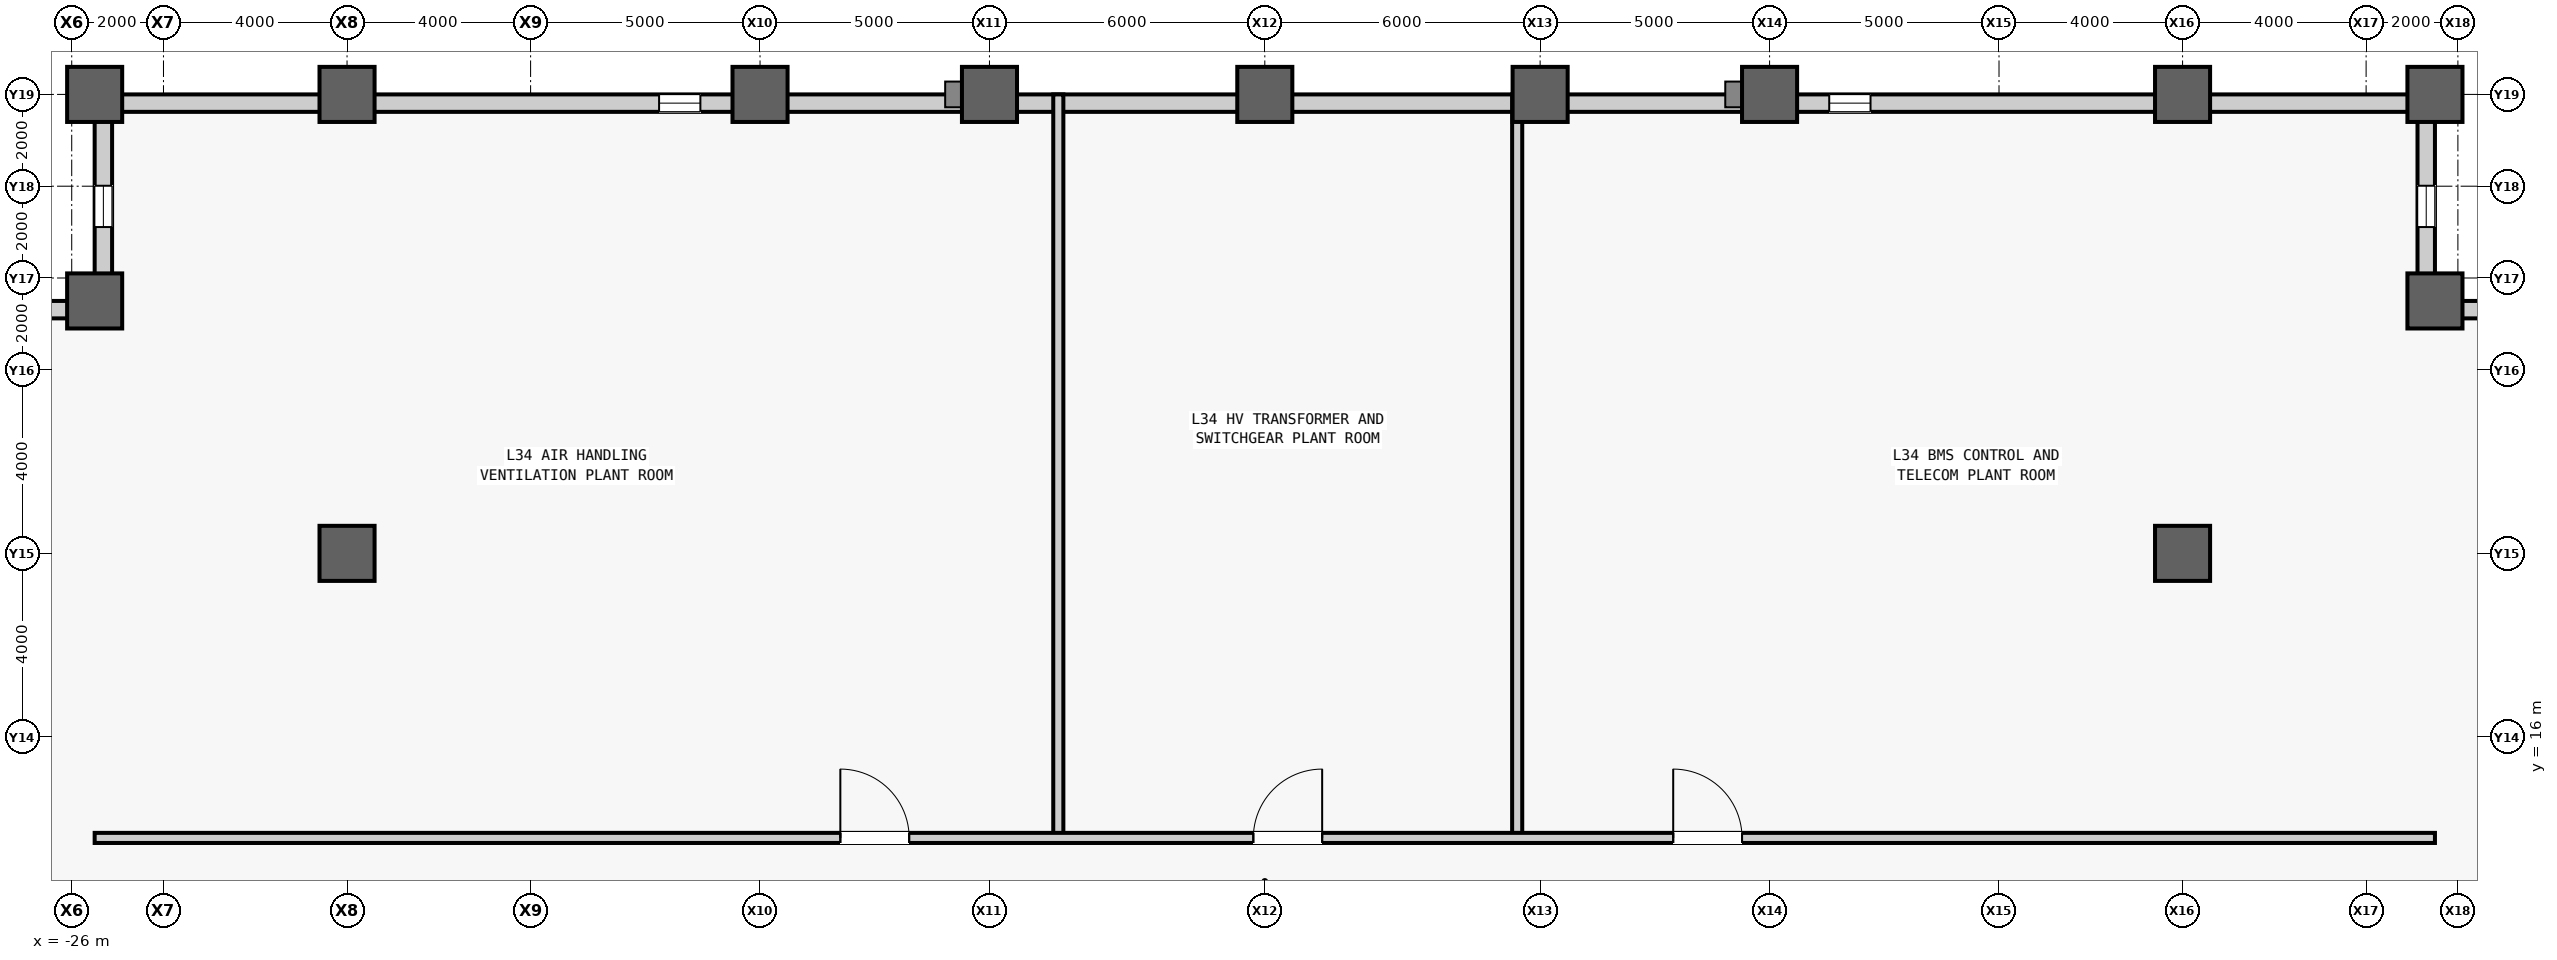
"""IFC4 building model, lengths in metres.
Left out: names, types, materials, properties, quantities, classifications, styles, units other than length and angle.
Written with IfcOpenShell. Run it as: python <this file> out.ifc"""

import sys

from ifc_helpers import new_model, si_unit, direction, frame, frame_2d, origin, origin_2d, place, context, subcontext, project, spatial, rectangle, hollow_rectangle, extrude, source, transform, mapped, element, fill, save


model = new_model("IFC4")
c1 = context("Model", 3, precision=1e-05, world=origin(), true_north=direction((0.0, 1.0)))
c2 = subcontext(c1, "Body", "Model", "MODEL_VIEW")
j1 = project(units=[si_unit("LENGTHUNIT", "METRE"), si_unit("PLANEANGLEUNIT", "RADIAN")], contexts=[c1])
p1 = place(None, origin())
s1 = spatial("IfcSite", under=j1, at=p1, CompositionType="ELEMENT")
p2 = place(p1, origin())
s2 = spatial("IfcBuilding", under=s1, at=p2, CompositionType="ELEMENT")
p3 = place(p2, frame((0.0, 0.0, 149.9)))
s3 = spatial("IfcBuildingStorey", under=s2, at=p3, CompositionType="ELEMENT", Elevation=149.9)
m1 = source(origin(), c2, "Body", "SweptSolid", [
    extrude(hollow_rectangle(XDim=1.2, YDim=1.2, WallThickness=0.07, at=origin_2d()), origin(), (0.0, 0.0, 1.0), 5.2),
])
for number, where, z_axis, x_axis in (
    (1, (-25.5, 25.5, 0.0), (0.0, 0.0, 1.0), (1.0, 0.0, 0.0)),
    (2, (-25.5, 30.0, 0.0), (0.0, 0.0, 1.0), (1.0, 0.0, 0.0)),
    (3, (-20.0, 20.0, 0.0), (0.0, 0.0, 1.0), (1.0, 0.0, 0.0)),
    (4, (-20.0, 30.0, 0.0), (0.0, 0.0, 1.0), (1.0, 0.0, 0.0)),
    (5, (-11.0, 30.0, 0.0), (0.0, 0.0, 1.0), (1.0, 0.0, 0.0)),
    (6, (-6.0, 30.0, 0.0), (0.0, 0.0, 1.0), (1.0, 0.0, 0.0)),
    (7, (0.0, 30.0, 0.0), (0.0, 0.0, 1.0), (1.0, 0.0, 0.0)),
    (8, (6.0, 30.0, 0.0), (0.0, 0.0, 1.0), (1.0, 0.0, 0.0)),
    (9, (11.0, 30.0, 0.0), (0.0, 0.0, 1.0), (1.0, 0.0, 0.0)),
    (10, (20.0, 20.0, 0.0), (0.0, 0.0, 1.0), (1.0, 0.0, 0.0)),
    (11, (20.0, 30.0, 0.0), (0.0, 0.0, 1.0), (1.0, 0.0, 0.0)),
    (12, (25.5, 25.5, 0.0), (0.0, 0.0, 1.0), (1.0, 0.0, 0.0)),
    (13, (25.5, 30.0, 0.0), (0.0, 0.0, 1.0), (1.0, 0.0, 0.0)),
):
    element("IfcColumn", number, at=place(p3, frame(where, z_axis=z_axis, x_axis=x_axis)), inside=s3, PredefinedType="COLUMN", context=c2, shape_type="MappedRepresentation", body=[
        mapped(m1, transform((0.0, 0.0, 0.0), scale=1.0)),
    ])
m2 = source(origin(), c2, "Body", "SweptSolid", [
    extrude(rectangle(XDim=4.12, YDim=0.38, at=frame_2d((2.06, 0.0))), origin(), (0.0, 0.0, 1.0), 4.285),
])
p4 = place(p3, frame((25.5, 25.31, 0.0), z_axis=(0.0, 0.0, 1.0), x_axis=(1.0, 0.0, 0.0)))
e14 = element("IfcWall", 14, at=p4, inside=s3, PredefinedType="STANDARD", context=c2, shape_type="MappedRepresentation", body=[
    mapped(m2, transform((0.0, 0.0, 0.0), scale=1.0)),
])
m3 = source(origin(), c2, "Body", "SweptSolid", [
    extrude(rectangle(XDim=0.9, YDim=2.4, at=frame_2d((0.45, 1.2))), frame((0.0, 0.2, 0.0), z_axis=(0.0, -1.0, 0.0), x_axis=(1.0, 0.0, 0.0)), (0.0, 0.0, 1.0), 0.4),
])
p5 = place(p4, frame((1.61, 0.0, 0.7)))
e15 = element("IfcOpeningElement", 15, at=p5, cuts=e14, PredefinedType="OPENING", context=c2, shape_type="MappedRepresentation", body=[
    mapped(m3, transform((0.0, 0.0, 0.0), scale=1.0)),
])
m4 = source(origin(), c2, "Body", "SweptSolid", [
    extrude(rectangle(XDim=4.12, YDim=0.38, at=frame_2d((2.06, 0.0))), origin(), (0.0, 0.0, 1.0), 4.205),
])
p6 = place(p3, frame((25.31, 25.5, 0.0), z_axis=(0.0, 0.0, 1.0), x_axis=(0.0, 1.0, 0.0)))
e16 = element("IfcWall", 16, at=p6, inside=s3, PredefinedType="STANDARD", context=c2, shape_type="MappedRepresentation", body=[
    mapped(m4, transform((0.0, 0.0, 0.0), scale=1.0)),
])
p7 = place(p6, frame((1.61, 0.0, 0.7)))
e17 = element("IfcOpeningElement", 17, at=p7, cuts=e16, PredefinedType="OPENING", context=c2, shape_type="MappedRepresentation", body=[
    mapped(m3, transform((0.0, 0.0, 0.0), scale=1.0)),
])
p8 = place(p3, frame((-25.31, 25.5, 0.0), z_axis=(0.0, 0.0, 1.0), x_axis=(0.0, 1.0, 0.0)))
e18 = element("IfcWall", 18, at=p8, inside=s3, PredefinedType="STANDARD", context=c2, shape_type="MappedRepresentation", body=[
    mapped(m4, transform((0.0, 0.0, 0.0), scale=1.0)),
])
p9 = place(p8, frame((1.61, 0.0, 0.7)))
e19 = element("IfcOpeningElement", 19, at=p9, cuts=e18, PredefinedType="OPENING", context=c2, shape_type="MappedRepresentation", body=[
    mapped(m3, transform((0.0, 0.0, 0.0), scale=1.0)),
])
p10 = place(p3, frame((-25.5, 25.31, 0.0), z_axis=(0.0, 0.0, 1.0), x_axis=(-1.0, 0.0, 0.0)))
e20 = element("IfcWall", 20, at=p10, inside=s3, PredefinedType="STANDARD", context=c2, shape_type="MappedRepresentation", body=[
    mapped(m2, transform((0.0, 0.0, 0.0), scale=1.0)),
])
p11 = place(p10, frame((1.61, 0.0, 0.7)))
e21 = element("IfcOpeningElement", 21, at=p11, cuts=e20, PredefinedType="OPENING", context=c2, shape_type="MappedRepresentation", body=[
    mapped(m3, transform((0.0, 0.0, 0.0), scale=1.0)),
])
m5 = source(origin(), c2, "Body", "SweptSolid", [
    extrude(rectangle(XDim=51.0, YDim=0.38, at=frame_2d((25.5, 0.0))), origin(), (0.0, 0.0, 1.0), 4.205),
])
p12 = place(p3, frame((-25.5, 29.81, 0.0), z_axis=(0.0, 0.0, 1.0), x_axis=(1.0, 0.0, 0.0)))
e22 = element("IfcWall", 22, at=p12, inside=s3, PredefinedType="STANDARD", context=c2, shape_type="MappedRepresentation", body=[
    mapped(m5, transform((0.0, 0.0, 0.0), scale=1.0)),
])
p13 = place(p12, frame((12.3, 0.0, 0.7)))
e23 = element("IfcOpeningElement", 23, at=p13, cuts=e22, PredefinedType="OPENING", context=c2, shape_type="MappedRepresentation", body=[
    mapped(m3, transform((0.0, 0.0, 0.0), scale=1.0)),
])
p14 = place(p12, frame((37.8, 0.0, 0.7)))
e24 = element("IfcOpeningElement", 24, at=p14, cuts=e22, PredefinedType="OPENING", context=c2, shape_type="MappedRepresentation", body=[
    mapped(m3, transform((0.0, 0.0, 0.0), scale=1.0)),
])
m6 = source(origin(), c2, "Body", "SweptSolid", [
    extrude(rectangle(XDim=16.2, YDim=0.22, at=frame_2d((8.1, 0.0))), origin(), (0.0, 0.0, 1.0), 4.98),
])
for number, where, z_axis, x_axis in (
    (25, (-4.5, 13.8, 0.0), (0.0, 0.0, 1.0), (0.0, 1.0, 0.0)),
    (26, (5.5, 13.8, 0.0), (0.0, 0.0, 1.0), (0.0, 1.0, 0.0)),
):
    element("IfcWall", number, at=place(p3, frame(where, z_axis=z_axis, x_axis=x_axis)), inside=s3, PredefinedType="PARTITIONING", context=c2, shape_type="MappedRepresentation", body=[
        mapped(m6, transform((0.0, 0.0, 0.0), scale=1.0)),
    ])
m7 = source(origin(), c2, "Body", "SweptSolid", [
    extrude(rectangle(XDim=51.0, YDim=0.22, at=frame_2d((25.5, 0.0))), origin(), (0.0, 0.0, 1.0), 4.98),
])
p15 = place(p3, frame((-25.5, 13.8, 0.0), z_axis=(0.0, 0.0, 1.0), x_axis=(1.0, 0.0, 0.0)))
e27 = element("IfcWall", 27, at=p15, inside=s3, PredefinedType="PARTITIONING", context=c2, shape_type="MappedRepresentation", body=[
    mapped(m7, transform((0.0, 0.0, 0.0), scale=1.0)),
])
m8 = source(origin(), c2, "Body", "SweptSolid", [
    extrude(rectangle(XDim=1.5, YDim=2.3, at=frame_2d((0.75, 1.15))), frame((0.0, 0.12, 0.0), z_axis=(0.0, -1.0, 0.0), x_axis=(1.0, 0.0, 0.0)), (0.0, 0.0, 1.0), 0.24),
])
p16 = place(p15, frame((16.25, 0.0, 0.0)))
e28 = element("IfcOpeningElement", 28, at=p16, cuts=e27, PredefinedType="OPENING", context=c2, shape_type="MappedRepresentation", body=[
    mapped(m8, transform((0.0, 0.0, 0.0), scale=1.0)),
])
p17 = place(p15, frame((25.25, 0.0, 0.0)))
e29 = element("IfcOpeningElement", 29, at=p17, cuts=e27, PredefinedType="OPENING", context=c2, shape_type="MappedRepresentation", body=[
    mapped(m8, transform((0.0, 0.0, 0.0), scale=1.0)),
])
p18 = place(p15, frame((34.4, 0.0, 0.0)))
e30 = element("IfcOpeningElement", 30, at=p18, cuts=e27, PredefinedType="OPENING", context=c2, shape_type="MappedRepresentation", body=[
    mapped(m8, transform((0.0, 0.0, 0.0), scale=1.0)),
])
m9 = source(origin(), c2, "Body", "SweptSolid", [
    extrude(rectangle(XDim=0.9, YDim=2.4, at=frame_2d((0.45, 1.2))), frame((0.0, 0.03, 0.0), z_axis=(0.0, -1.0, 0.0), x_axis=(1.0, 0.0, 0.0)), (0.0, 0.0, 1.0), 0.06),
])
p19 = place(p7, origin())
e31 = element("IfcWindow", 31, at=p19, inside=s3, PartitioningType="SINGLE_PANEL", PredefinedType="WINDOW", context=c2, shape_type="MappedRepresentation", body=[
    mapped(m9, transform((0.0, 0.0, 0.0), scale=1.0)),
])
fill(e17, e31)
p20 = place(p9, origin())
e32 = element("IfcWindow", 32, at=p20, inside=s3, PartitioningType="SINGLE_PANEL", PredefinedType="WINDOW", context=c2, shape_type="MappedRepresentation", body=[
    mapped(m9, transform((0.0, 0.0, 0.0), scale=1.0)),
])
fill(e19, e32)
p21 = place(p13, origin())
e33 = element("IfcWindow", 33, at=p21, inside=s3, PartitioningType="SINGLE_PANEL", PredefinedType="WINDOW", context=c2, shape_type="MappedRepresentation", body=[
    mapped(m9, transform((0.0, 0.0, 0.0), scale=1.0)),
])
fill(e23, e33)
p22 = place(p14, origin())
e34 = element("IfcWindow", 34, at=p22, inside=s3, PartitioningType="SINGLE_PANEL", PredefinedType="WINDOW", context=c2, shape_type="MappedRepresentation", body=[
    mapped(m9, transform((0.0, 0.0, 0.0), scale=1.0)),
])
fill(e24, e34)
m10 = source(origin(), c2, "Body", "SweptSolid", [
    extrude(rectangle(XDim=1.5, YDim=2.3, at=frame_2d((0.75, 1.15))), frame((0.0, 0.025, 0.0), z_axis=(0.0, -1.0, 0.0), x_axis=(1.0, 0.0, 0.0)), (0.0, 0.0, 1.0), 0.05),
])
p23 = place(p16, origin())
e35 = element("IfcDoor", 35, at=p23, inside=s3, OperationType="SINGLE_SWING_LEFT", PredefinedType="DOOR", context=c2, shape_type="MappedRepresentation", body=[
    mapped(m10, transform((0.0, 0.0, 0.0), scale=1.0)),
])
fill(e28, e35)
p24 = place(p17, origin())
e36 = element("IfcDoor", 36, at=p24, inside=s3, OperationType="SINGLE_SWING_RIGHT", PredefinedType="DOOR", context=c2, shape_type="MappedRepresentation", body=[
    mapped(m10, transform((0.0, 0.0, 0.0), scale=1.0)),
])
fill(e29, e36)
p25 = place(p18, origin())
e37 = element("IfcDoor", 37, at=p25, inside=s3, OperationType="SINGLE_SWING_LEFT", PredefinedType="DOOR", context=c2, shape_type="MappedRepresentation", body=[
    mapped(m10, transform((0.0, 0.0, 0.0), scale=1.0)),
])
fill(e30, e37)
save(model, sys.argv[1])
